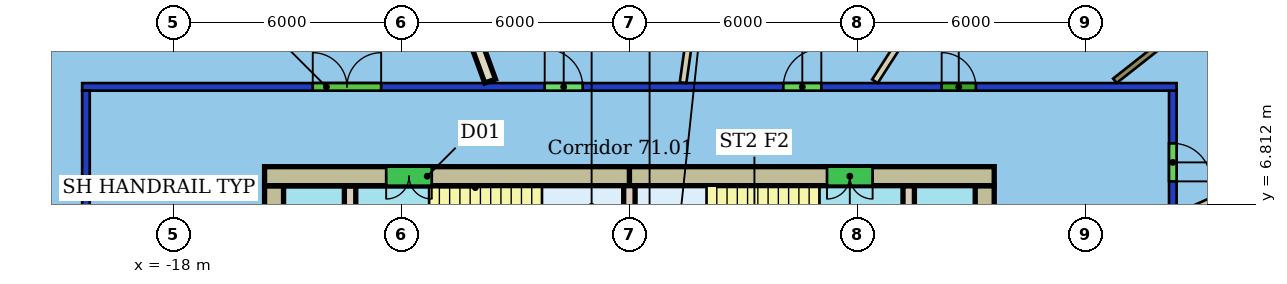
"""IFC4 building model, lengths in metres.
Left out: names, types, materials, properties, quantities, classifications, styles, units other than length and angle.
Written with IfcOpenShell. Run it as: python <this file> out.ifc"""

import sys

from ifc_helpers import new_model, si_unit, direction, frame, frame_2d, origin, place, context, subcontext, project, spatial, rectangle, extrude, element, fill, save


model = new_model("IFC4")
c1 = context("Model", 3, precision=1e-05, world=origin(), true_north=direction((0.0, 1.0)))
c2 = subcontext(c1, "Body", "Model", "MODEL_VIEW")
j1 = project(units=[si_unit("LENGTHUNIT", "METRE"), si_unit("PLANEANGLEUNIT", "RADIAN")], contexts=[c1])
p1 = place(None, origin())
s1 = spatial("IfcSite", under=j1, at=p1, CompositionType="ELEMENT")
p2 = place(p1, origin())
s2 = spatial("IfcBuilding", under=s1, at=p2, CompositionType="ELEMENT")
p3 = place(p2, frame((0.0, 0.0, 286.5)))
s3 = spatial("IfcBuildingStorey", under=s2, at=p3, CompositionType="ELEMENT", Elevation=286.5)
p4 = place(p3, frame((-20.3, -9.8, 0.0), z_axis=(0.0, 0.0, 1.0), x_axis=(0.0, 1.0, 0.0)))
e1 = element("IfcWall", 1, at=p4, inside=s3, PredefinedType="PARTITIONING", context=c2, shape_type="SweptSolid", body=[
    extrude(rectangle(XDim=19.6, YDim=0.2, at=frame_2d((9.8, 0.0))), origin(), (0.0, 0.0, 1.0), 3.1),
])
p5 = place(p4, frame((8.643, 0.0, 0.0)))
e2 = element("IfcOpeningElement", 2, at=p5, cuts=e1, PredefinedType="OPENING", context=c2, shape_type="SweptSolid", body=[
    extrude(rectangle(XDim=1.5, YDim=2.1, at=frame_2d((0.75, 1.05))), frame((0.0, 0.11, 0.0), z_axis=(0.0, -1.0, 0.0), x_axis=(1.0, 0.0, 0.0)), (0.0, 0.0, 1.0), 0.22),
])
p6 = place(p4, frame((4.379, 0.0, 0.0)))
e3 = element("IfcOpeningElement", 3, at=p6, cuts=e1, PredefinedType="OPENING", context=c2, shape_type="SweptSolid", body=[
    extrude(rectangle(XDim=1.0, YDim=2.1, at=frame_2d((0.5, 1.05))), frame((0.0, 0.11, 0.0), z_axis=(0.0, -1.0, 0.0), x_axis=(1.0, 0.0, 0.0)), (0.0, 0.0, 1.0), 0.22),
])
p7 = place(p3, frame((-20.4, 9.9, 0.0), z_axis=(0.0, 0.0, 1.0), x_axis=(1.0, 0.0, 0.0)))
e4 = element("IfcWall", 4, at=p7, inside=s3, PredefinedType="PARTITIONING", context=c2, shape_type="SweptSolid", body=[
    extrude(rectangle(XDim=28.8, YDim=0.2, at=frame_2d((14.4, 0.0))), origin(), (0.0, 0.0, 1.0), 3.1),
])
p8 = place(p7, frame((12.171, 0.0, 0.0)))
e5 = element("IfcOpeningElement", 5, at=p8, cuts=e4, PredefinedType="OPENING", context=c2, shape_type="SweptSolid", body=[
    extrude(rectangle(XDim=1.0, YDim=2.4, at=frame_2d((0.5, 1.2))), frame((0.0, 0.11, 0.0), z_axis=(0.0, -1.0, 0.0), x_axis=(1.0, 0.0, 0.0)), (0.0, 0.0, 1.0), 0.22),
])
p9 = place(p7, frame((6.068, 0.0, 0.0)))
e6 = element("IfcOpeningElement", 6, at=p9, cuts=e4, PredefinedType="OPENING", context=c2, shape_type="SweptSolid", body=[
    extrude(rectangle(XDim=1.8, YDim=2.4, at=frame_2d((0.9, 1.2))), frame((0.0, 0.11, 0.0), z_axis=(0.0, -1.0, 0.0), x_axis=(1.0, 0.0, 0.0)), (0.0, 0.0, 1.0), 0.22),
])
p10 = place(p7, frame((22.617, 0.0, 0.0)))
e7 = element("IfcOpeningElement", 7, at=p10, cuts=e4, PredefinedType="OPENING", context=c2, shape_type="SweptSolid", body=[
    extrude(rectangle(XDim=0.9, YDim=2.1, at=frame_2d((0.45, 1.05))), frame((0.0, 0.11, 0.0), z_axis=(0.0, -1.0, 0.0), x_axis=(1.0, 0.0, 0.0)), (0.0, 0.0, 1.0), 0.22),
])
p11 = place(p7, frame((18.45, 0.0, 0.0)))
e8 = element("IfcOpeningElement", 8, at=p11, cuts=e4, PredefinedType="OPENING", context=c2, shape_type="SweptSolid", body=[
    extrude(rectangle(XDim=1.0, YDim=2.1, at=frame_2d((0.5, 1.05))), frame((0.0, 0.11, 0.0), z_axis=(0.0, -1.0, 0.0), x_axis=(1.0, 0.0, 0.0)), (0.0, 0.0, 1.0), 0.22),
])
p12 = place(p3, frame((8.3, 9.8, 0.0), z_axis=(0.0, 0.0, 1.0), x_axis=(0.0, -1.0, 0.0)))
e9 = element("IfcWall", 9, at=p12, inside=s3, PredefinedType="PARTITIONING", context=c2, shape_type="SweptSolid", body=[
    extrude(rectangle(XDim=19.6, YDim=0.2, at=frame_2d((9.8, 0.0))), origin(), (0.0, 0.0, 1.0), 3.1),
])
p13 = place(p12, frame((14.011, 0.0, 0.0)))
e10 = element("IfcOpeningElement", 10, at=p13, cuts=e9, PredefinedType="OPENING", context=c2, shape_type="SweptSolid", body=[
    extrude(rectangle(XDim=1.5, YDim=2.1, at=frame_2d((0.75, 1.05))), frame((0.0, 0.11, 0.0), z_axis=(0.0, -1.0, 0.0), x_axis=(1.0, 0.0, 0.0)), (0.0, 0.0, 1.0), 0.22),
])
p14 = place(p12, frame((8.798, 0.0, 0.0)))
e11 = element("IfcOpeningElement", 11, at=p14, cuts=e9, PredefinedType="OPENING", context=c2, shape_type="SweptSolid", body=[
    extrude(rectangle(XDim=0.9, YDim=2.1, at=frame_2d((0.45, 1.05))), frame((0.0, 0.11, 0.0), z_axis=(0.0, -1.0, 0.0), x_axis=(1.0, 0.0, 0.0)), (0.0, 0.0, 1.0), 0.22),
])
p15 = place(p12, frame((5.084, 0.0, 0.0)))
e12 = element("IfcOpeningElement", 12, at=p15, cuts=e9, PredefinedType="OPENING", context=c2, shape_type="SweptSolid", body=[
    extrude(rectangle(XDim=1.5, YDim=2.4, at=frame_2d((0.75, 1.2))), frame((0.0, 0.11, 0.0), z_axis=(0.0, -1.0, 0.0), x_axis=(1.0, 0.0, 0.0)), (0.0, 0.0, 1.0), 0.22),
])
p16 = place(p12, frame((1.387, 0.0, 0.0)))
e13 = element("IfcOpeningElement", 13, at=p16, cuts=e9, PredefinedType="OPENING", context=c2, shape_type="SweptSolid", body=[
    extrude(rectangle(XDim=1.0, YDim=2.1, at=frame_2d((0.5, 1.05))), frame((0.0, 0.11, 0.0), z_axis=(0.0, -1.0, 0.0), x_axis=(1.0, 0.0, 0.0)), (0.0, 0.0, 1.0), 0.22),
])
p17 = place(p3, frame((-2.62, 23.948, 0.0), z_axis=(0.0, 0.0, 1.0), x_axis=(-0.139726049036, -0.990190199518, 0.0)))
e14 = element("IfcWall", 14, at=p17, inside=s3, PredefinedType="PARTITIONING", context=c2, shape_type="SweptSolid", body=[
    extrude(rectangle(XDim=14.074, YDim=0.175, at=frame_2d((7.037, 0.0))), origin(), (0.0, 0.0, 1.0), 3.45),
])
p18 = place(p3, frame((-13.551, 20.712, 0.0), z_axis=(0.0, 0.0, 1.0), x_axis=(0.342537626191, -0.939504111031, 0.0)))
e15 = element("IfcWall", 15, at=p18, inside=s3, PredefinedType="PARTITIONING", context=c2, shape_type="SweptSolid", body=[
    extrude(rectangle(XDim=11.347, YDim=0.3, at=frame_2d((5.673, 0.0))), origin(), (0.0, 0.0, 1.0), 3.45),
])
p19 = place(p3, frame((14.644, 9.295, 0.0), z_axis=(0.0, 0.0, 1.0), x_axis=(-0.911835601306, -0.410555521447, 0.0)))
e16 = element("IfcWall", 16, at=p19, inside=s3, PredefinedType="PARTITIONING", context=c2, shape_type="SweptSolid", body=[
    extrude(rectangle(XDim=6.808, YDim=0.175, at=frame_2d((3.404, 0.0))), origin(), (0.0, 0.0, 1.0), 3.45),
])
p20 = place(p3, frame((12.656, 14.689, 0.0), z_axis=(0.0, 0.0, 1.0), x_axis=(-0.78567951845, -0.618633731936, 0.0)))
e17 = element("IfcWall", 17, at=p20, inside=s3, PredefinedType="PARTITIONING", context=c2, shape_type="SweptSolid", body=[
    extrude(rectangle(XDim=7.484, YDim=0.15, at=frame_2d((3.742, 0.0))), origin(), (0.0, 0.0, 1.0), 3.45),
])
p21 = place(p3, frame((7.375, 20.796, 0.0), z_axis=(0.0, 0.0, 1.0), x_axis=(-0.540918824155, -0.841074803852, 0.0)))
e18 = element("IfcWall", 18, at=p21, inside=s3, PredefinedType="PARTITIONING", context=c2, shape_type="SweptSolid", body=[
    extrude(rectangle(XDim=12.78, YDim=0.175, at=frame_2d((6.39, 0.0))), origin(), (0.0, 0.0, 1.0), 3.45),
])
p22 = place(p3, frame((3.6, 7.55, 0.0), z_axis=(0.0, 0.0, 1.0), x_axis=(-1.0, 0.0, 0.0)))
e19 = element("IfcWall", 19, at=p22, inside=s3, PredefinedType="SHEAR", context=c2, shape_type="SweptSolid", body=[
    extrude(rectangle(XDim=9.6, YDim=0.5, at=frame_2d((4.8, 0.0))), origin(), (0.0, 0.0, 1.0), 3.3),
])
p23 = place(p22, frame((3.2, 0.0, 0.0)))
e20 = element("IfcOpeningElement", 20, at=p23, cuts=e19, PredefinedType="OPENING", context=c2, shape_type="SweptSolid", body=[
    extrude(rectangle(XDim=1.2, YDim=2.1, at=frame_2d((0.6, 1.05))), frame((0.0, 0.26, 0.0), z_axis=(0.0, -1.0, 0.0), x_axis=(1.0, 0.0, 0.0)), (0.0, 0.0, 1.0), 0.52),
])
p24 = place(p3, frame((-6.0, 7.55, 0.0), z_axis=(0.0, 0.0, 1.0), x_axis=(-1.0, 0.0, 0.0)))
e21 = element("IfcWall", 21, at=p24, inside=s3, PredefinedType="SHEAR", context=c2, shape_type="SweptSolid", body=[
    extrude(rectangle(XDim=9.6, YDim=0.5, at=frame_2d((4.8, 0.0))), origin(), (0.0, 0.0, 1.0), 3.3),
])
p25 = place(p24, frame((5.2, 0.0, 0.0)))
e22 = element("IfcOpeningElement", 22, at=p25, cuts=e21, PredefinedType="OPENING", context=c2, shape_type="SweptSolid", body=[
    extrude(rectangle(XDim=1.2, YDim=2.1, at=frame_2d((0.6, 1.05))), frame((0.0, 0.26, 0.0), z_axis=(0.0, -1.0, 0.0), x_axis=(1.0, 0.0, 0.0)), (0.0, 0.0, 1.0), 0.52),
])
p26 = place(p3, frame((-15.35, 7.3, 0.0), z_axis=(0.0, 0.0, 1.0), x_axis=(0.0, -1.0, 0.0)))
e23 = element("IfcWall", 23, at=p26, inside=s3, PredefinedType="SHEAR", context=c2, shape_type="SweptSolid", body=[
    extrude(rectangle(XDim=14.6, YDim=0.5, at=frame_2d((7.3, 0.0))), origin(), (0.0, 0.0, 1.0), 3.3),
])
p27 = place(p26, frame((10.6, 0.0, 0.0)))
e24 = element("IfcOpeningElement", 24, at=p27, cuts=e23, PredefinedType="OPENING", context=c2, shape_type="SweptSolid", body=[
    extrude(rectangle(XDim=1.2, YDim=2.1, at=frame_2d((0.6, 1.05))), frame((0.0, 0.26, 0.0), z_axis=(0.0, -1.0, 0.0), x_axis=(1.0, 0.0, 0.0)), (0.0, 0.0, 1.0), 0.52),
])
p28 = place(p26, frame((2.8, 0.0, 0.0)))
e25 = element("IfcOpeningElement", 25, at=p28, cuts=e23, PredefinedType="OPENING", context=c2, shape_type="SweptSolid", body=[
    extrude(rectangle(XDim=1.2, YDim=2.1, at=frame_2d((0.6, 1.05))), frame((0.0, 0.26, 0.0), z_axis=(0.0, -1.0, 0.0), x_axis=(1.0, 0.0, 0.0)), (0.0, 0.0, 1.0), 0.52),
])
p29 = place(p3, frame((3.35, -7.3, 0.0), z_axis=(0.0, 0.0, 1.0), x_axis=(0.0, 1.0, 0.0)))
e26 = element("IfcWall", 26, at=p29, inside=s3, PredefinedType="SHEAR", context=c2, shape_type="SweptSolid", body=[
    extrude(rectangle(XDim=14.6, YDim=0.5, at=frame_2d((7.3, 0.0))), origin(), (0.0, 0.0, 1.0), 3.3),
])
p30 = place(p29, frame((2.8, 0.0, 0.0)))
e27 = element("IfcOpeningElement", 27, at=p30, cuts=e26, PredefinedType="OPENING", context=c2, shape_type="SweptSolid", body=[
    extrude(rectangle(XDim=1.2, YDim=2.1, at=frame_2d((0.6, 1.05))), frame((0.0, 0.26, 0.0), z_axis=(0.0, -1.0, 0.0), x_axis=(1.0, 0.0, 0.0)), (0.0, 0.0, 1.0), 0.52),
])
p31 = place(p29, frame((10.6, 0.0, 0.0)))
e28 = element("IfcOpeningElement", 28, at=p31, cuts=e26, PredefinedType="OPENING", context=c2, shape_type="SweptSolid", body=[
    extrude(rectangle(XDim=1.2, YDim=2.1, at=frame_2d((0.6, 1.05))), frame((0.0, 0.26, 0.0), z_axis=(0.0, -1.0, 0.0), x_axis=(1.0, 0.0, 0.0)), (0.0, 0.0, 1.0), 0.52),
])
p32 = place(p3, frame((-13.35, 7.3, 0.0), z_axis=(0.0, 0.0, 1.0), x_axis=(0.0, -1.0, 0.0)))
e29 = element("IfcWall", 29, at=p32, inside=s3, PredefinedType="SHEAR", context=c2, shape_type="SweptSolid", body=[
    extrude(rectangle(XDim=14.6, YDim=0.3, at=frame_2d((7.3, 0.0))), origin(), (0.0, 0.0, 1.0), 3.3),
])
p33 = place(p32, frame((6.55, 0.0, 0.0)))
e30 = element("IfcOpeningElement", 30, at=p33, cuts=e29, PredefinedType="OPENING", context=c2, shape_type="SweptSolid", body=[
    extrude(rectangle(XDim=1.5, YDim=2.1, at=frame_2d((0.75, 1.05))), frame((0.0, 0.16, 0.0), z_axis=(0.0, -1.0, 0.0), x_axis=(1.0, 0.0, 0.0)), (0.0, 0.0, 1.0), 0.32),
])
p34 = place(p3, frame((1.35, -7.3, 0.0), z_axis=(0.0, 0.0, 1.0), x_axis=(0.0, 1.0, 0.0)))
e31 = element("IfcWall", 31, at=p34, inside=s3, PredefinedType="SHEAR", context=c2, shape_type="SweptSolid", body=[
    extrude(rectangle(XDim=14.6, YDim=0.3, at=frame_2d((7.3, 0.0))), origin(), (0.0, 0.0, 1.0), 3.3),
])
p35 = place(p34, frame((1.21, 0.0, 0.0)))
e32 = element("IfcOpeningElement", 32, at=p35, cuts=e31, PredefinedType="OPENING", context=c2, shape_type="SweptSolid", body=[
    extrude(rectangle(XDim=1.0, YDim=2.1, at=frame_2d((0.5, 1.05))), frame((0.0, 0.16, 0.0), z_axis=(0.0, -1.0, 0.0), x_axis=(1.0, 0.0, 0.0)), (0.0, 0.0, 1.0), 0.32),
])
p36 = place(p34, frame((6.55, 0.0, 0.0)))
e33 = element("IfcOpeningElement", 33, at=p36, cuts=e31, PredefinedType="OPENING", context=c2, shape_type="SweptSolid", body=[
    extrude(rectangle(XDim=1.5, YDim=2.1, at=frame_2d((0.75, 1.05))), frame((0.0, 0.16, 0.0), z_axis=(0.0, -1.0, 0.0), x_axis=(1.0, 0.0, 0.0)), (0.0, 0.0, 1.0), 0.32),
])
p37 = place(p3, frame((-6.0, 3.88, 0.0), z_axis=(0.0, 0.0, 1.0), x_axis=(0.0, 1.0, 0.0)))
e34 = element("IfcWall", 34, at=p37, inside=s3, PredefinedType="SHEAR", context=c2, shape_type="SweptSolid", body=[
    extrude(rectangle(XDim=3.42, YDim=0.3, at=frame_2d((1.71, 0.0))), origin(), (0.0, 0.0, 1.0), 3.3),
])
p38 = place(p8, origin())
e35 = element("IfcDoor", 35, at=p38, inside=s3, OperationType="SINGLE_SWING_LEFT", PredefinedType="DOOR", context=c2, shape_type="SweptSolid", body=[
    extrude(rectangle(XDim=1.0, YDim=2.4, at=frame_2d((0.5, 1.2))), frame((0.0, 0.025, 0.0), z_axis=(0.0, -1.0, 0.0), x_axis=(1.0, 0.0, 0.0)), (0.0, 0.0, 1.0), 0.05),
])
fill(e5, e35)
p39 = place(p9, origin())
e36 = element("IfcDoor", 36, at=p39, inside=s3, OperationType="DOUBLE_DOOR_SINGLE_SWING", PredefinedType="DOOR", context=c2, shape_type="SweptSolid", body=[
    extrude(rectangle(XDim=1.8, YDim=2.4, at=frame_2d((0.9, 1.2))), frame((0.0, 0.025, 0.0), z_axis=(0.0, -1.0, 0.0), x_axis=(1.0, 0.0, 0.0)), (0.0, 0.0, 1.0), 0.05),
])
fill(e6, e36)
p40 = place(p16, origin())
e37 = element("IfcDoor", 37, at=p40, inside=s3, OperationType="SINGLE_SWING_RIGHT", PredefinedType="DOOR", context=c2, shape_type="SweptSolid", body=[
    extrude(rectangle(XDim=1.0, YDim=2.1, at=frame_2d((0.5, 1.05))), frame((0.0, 0.025, 0.0), z_axis=(0.0, -1.0, 0.0), x_axis=(1.0, 0.0, 0.0)), (0.0, 0.0, 1.0), 0.05),
])
fill(e13, e37)
p41 = place(p10, origin())
e38 = element("IfcDoor", 38, at=p41, inside=s3, OperationType="SINGLE_SWING_LEFT", PredefinedType="DOOR", context=c2, shape_type="SweptSolid", body=[
    extrude(rectangle(XDim=0.9, YDim=2.1, at=frame_2d((0.45, 1.05))), frame((0.0, 0.025, 0.0), z_axis=(0.0, -1.0, 0.0), x_axis=(1.0, 0.0, 0.0)), (0.0, 0.0, 1.0), 0.05),
])
fill(e7, e38)
p42 = place(p11, origin())
e39 = element("IfcDoor", 39, at=p42, inside=s3, OperationType="SINGLE_SWING_RIGHT", PredefinedType="DOOR", context=c2, shape_type="SweptSolid", body=[
    extrude(rectangle(XDim=1.0, YDim=2.1, at=frame_2d((0.5, 1.05))), frame((0.0, 0.025, 0.0), z_axis=(0.0, -1.0, 0.0), x_axis=(1.0, 0.0, 0.0)), (0.0, 0.0, 1.0), 0.05),
])
fill(e8, e39)
p43 = place(p23, origin())
e40 = element("IfcDoor", 40, at=p43, inside=s3, OperationType="DOUBLE_DOOR_SINGLE_SWING", PredefinedType="NOTDEFINED", context=c2, shape_type="SweptSolid", body=[
    extrude(rectangle(XDim=1.2, YDim=2.1, at=frame_2d((0.6, 1.05))), frame((0.0, 0.025, 0.0), z_axis=(0.0, -1.0, 0.0), x_axis=(1.0, 0.0, 0.0)), (0.0, 0.0, 1.0), 0.05),
])
fill(e20, e40)
p44 = place(p25, origin())
e41 = element("IfcDoor", 41, at=p44, inside=s3, OperationType="DOUBLE_DOOR_SINGLE_SWING", PredefinedType="NOTDEFINED", context=c2, shape_type="SweptSolid", body=[
    extrude(rectangle(XDim=1.2, YDim=2.1, at=frame_2d((0.6, 1.05))), frame((0.0, 0.025, 0.0), z_axis=(0.0, -1.0, 0.0), x_axis=(1.0, 0.0, 0.0)), (0.0, 0.0, 1.0), 0.05),
])
fill(e22, e41)
save(model, sys.argv[1])
